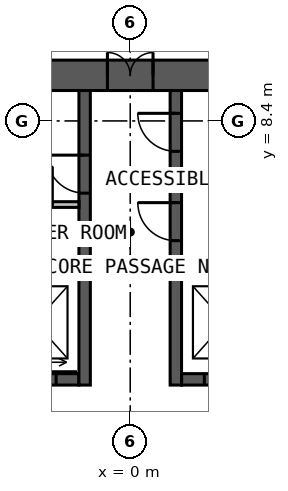
"""IFC4 building model, lengths in metres.
Left out: names, types, materials, properties, quantities, classifications, styles, units other than length and angle.
Written with IfcOpenShell. Run it as: python <this file> out.ifc"""

import sys

from ifc_helpers import new_model, si_unit, direction, frame, frame_2d, origin, place, context, subcontext, project, spatial, rectangle, extrude, element, fill, save


model = new_model("IFC4")
c1 = context("Model", 3, precision=1e-05, world=origin(), true_north=direction((0.0, 1.0)))
c2 = subcontext(c1, "Body", "Model", "MODEL_VIEW")
j1 = project(units=[si_unit("LENGTHUNIT", "METRE"), si_unit("PLANEANGLEUNIT", "RADIAN")], contexts=[c1])
p1 = place(None, origin())
s1 = spatial("IfcSite", under=j1, at=p1, CompositionType="ELEMENT")
p2 = place(p1, origin())
s2 = spatial("IfcBuilding", under=s1, at=p2, CompositionType="ELEMENT")
p3 = place(p2, frame((0.0, 0.0, 21.0)))
s3 = spatial("IfcBuildingStorey", under=s2, at=p3, CompositionType="ELEMENT", Elevation=21.0)
p4 = place(p3, frame((-10.0, 9.6, 0.0), z_axis=(0.0, 0.0, 1.0), x_axis=(1.0, 0.0, 0.0)))
e1 = element("IfcWall", 1, at=p4, inside=s3, PredefinedType="SOLIDWALL", context=c2, shape_type="SweptSolid", body=[
    extrude(rectangle(XDim=20.0, YDim=0.8, at=frame_2d((10.0, 0.0))), origin(), (0.0, 0.0, 1.0), 4.0),
])
p5 = place(p4, frame((9.4, 0.0, 0.0)))
e2 = element("IfcOpeningElement", 2, at=p5, cuts=e1, PredefinedType="OPENING", context=c2, shape_type="SweptSolid", body=[
    extrude(rectangle(XDim=1.2, YDim=2.2, at=frame_2d((0.6, 1.1))), frame((0.0, 0.41, 0.0), z_axis=(0.0, -1.0, 0.0), x_axis=(1.0, 0.0, 0.0)), (0.0, 0.0, 1.0), 0.82),
])
p6 = place(p3, frame((-6.2, 1.6, 0.0), z_axis=(0.0, 0.0, 1.0), x_axis=(1.0, 0.0, 0.0)))
e3 = element("IfcWall", 3, at=p6, inside=s3, PredefinedType="SOLIDWALL", context=c2, shape_type="SweptSolid", body=[
    extrude(rectangle(XDim=4.85, YDim=0.3, at=frame_2d((2.425, 0.0))), origin(), (0.0, 0.0, 1.0), 4.0),
])
p7 = place(p6, frame((0.625, 0.0, 0.0)))
e4 = element("IfcOpeningElement", 4, at=p7, cuts=e3, PredefinedType="OPENING", context=c2, shape_type="SweptSolid", body=[
    extrude(rectangle(XDim=1.1, YDim=2.2, at=frame_2d((0.55, 1.1))), frame((0.0, 0.16, 0.0), z_axis=(0.0, -1.0, 0.0), x_axis=(1.0, 0.0, 0.0)), (0.0, 0.0, 1.0), 0.32),
])
p8 = place(p6, frame((3.15, 0.0, 0.0)))
e5 = element("IfcOpeningElement", 5, at=p8, cuts=e3, PredefinedType="OPENING", context=c2, shape_type="SweptSolid", body=[
    extrude(rectangle(XDim=1.1, YDim=2.2, at=frame_2d((0.55, 1.1))), frame((0.0, 0.16, 0.0), z_axis=(0.0, -1.0, 0.0), x_axis=(1.0, 0.0, 0.0)), (0.0, 0.0, 1.0), 0.32),
])
p9 = place(p3, frame((1.35, 1.6, 0.0), z_axis=(0.0, 0.0, 1.0), x_axis=(1.0, 0.0, 0.0)))
e6 = element("IfcWall", 6, at=p9, inside=s3, PredefinedType="SOLIDWALL", context=c2, shape_type="SweptSolid", body=[
    extrude(rectangle(XDim=4.85, YDim=0.3, at=frame_2d((2.425, 0.0))), origin(), (0.0, 0.0, 1.0), 4.0),
])
p10 = place(p9, frame((0.6, 0.0, 0.0)))
e7 = element("IfcOpeningElement", 7, at=p10, cuts=e6, PredefinedType="OPENING", context=c2, shape_type="SweptSolid", body=[
    extrude(rectangle(XDim=1.1, YDim=2.2, at=frame_2d((0.55, 1.1))), frame((0.0, 0.16, 0.0), z_axis=(0.0, -1.0, 0.0), x_axis=(1.0, 0.0, 0.0)), (0.0, 0.0, 1.0), 0.32),
])
p11 = place(p9, frame((3.125, 0.0, 0.0)))
e8 = element("IfcOpeningElement", 8, at=p11, cuts=e6, PredefinedType="OPENING", context=c2, shape_type="SweptSolid", body=[
    extrude(rectangle(XDim=1.1, YDim=2.2, at=frame_2d((0.55, 1.1))), frame((0.0, 0.16, 0.0), z_axis=(0.0, -1.0, 0.0), x_axis=(1.0, 0.0, 0.0)), (0.0, 0.0, 1.0), 0.32),
])
for number, where, z_axis, x_axis in (
    (9, (-6.2, 4.6, 0.0), (0.0, 0.0, 1.0), (1.0, 0.0, 0.0)),
    (10, (1.35, 4.6, 0.0), (0.0, 0.0, 1.0), (1.0, 0.0, 0.0)),
):
    element("IfcWall", number, at=place(p3, frame(where, z_axis=z_axis, x_axis=x_axis)), inside=s3, PredefinedType="SOLIDWALL", context=c2, shape_type="SweptSolid", body=[
        extrude(rectangle(XDim=4.85, YDim=0.3, at=frame_2d((2.425, 0.0))), origin(), (0.0, 0.0, 1.0), 4.0),
    ])
p12 = place(p3, frame((-1.2, 1.45, 0.0), z_axis=(0.0, 0.0, 1.0), x_axis=(0.0, 1.0, 0.0)))
e11 = element("IfcWall", 11, at=p12, inside=s3, PredefinedType="SOLIDWALL", context=c2, shape_type="SweptSolid", body=[
    extrude(rectangle(XDim=7.75, YDim=0.3, at=frame_2d((3.875, 0.0))), origin(), (0.0, 0.0, 1.0), 4.0),
])
p13 = place(p12, frame((5.05, 0.0, 0.0)))
e12 = element("IfcOpeningElement", 12, at=p13, cuts=e11, PredefinedType="OPENING", context=c2, shape_type="SweptSolid", body=[
    extrude(rectangle(XDim=1.0, YDim=2.2, at=frame_2d((0.5, 1.1))), frame((0.0, 0.16, 0.0), z_axis=(0.0, -1.0, 0.0), x_axis=(1.0, 0.0, 0.0)), (0.0, 0.0, 1.0), 0.32),
])
p14 = place(p3, frame((1.2, 1.45, 0.0), z_axis=(0.0, 0.0, 1.0), x_axis=(0.0, 1.0, 0.0)))
e13 = element("IfcWall", 13, at=p14, inside=s3, PredefinedType="SOLIDWALL", context=c2, shape_type="SweptSolid", body=[
    extrude(rectangle(XDim=7.75, YDim=0.3, at=frame_2d((3.875, 0.0))), origin(), (0.0, 0.0, 1.0), 4.0),
])
p15 = place(p14, frame((3.8, 0.0, 0.0)))
e14 = element("IfcOpeningElement", 14, at=p15, cuts=e13, PredefinedType="OPENING", context=c2, shape_type="SweptSolid", body=[
    extrude(rectangle(XDim=1.0, YDim=2.2, at=frame_2d((0.5, 1.1))), frame((0.0, 0.16, 0.0), z_axis=(0.0, -1.0, 0.0), x_axis=(1.0, 0.0, 0.0)), (0.0, 0.0, 1.0), 0.32),
])
p16 = place(p14, frame((6.15, 0.0, 0.0)))
e15 = element("IfcOpeningElement", 15, at=p16, cuts=e13, PredefinedType="OPENING", context=c2, shape_type="SweptSolid", body=[
    extrude(rectangle(XDim=1.0, YDim=2.2, at=frame_2d((0.5, 1.1))), frame((0.0, 0.16, 0.0), z_axis=(0.0, -1.0, 0.0), x_axis=(1.0, 0.0, 0.0)), (0.0, 0.0, 1.0), 0.32),
])
p17 = place(p3, frame((1.35, 6.8, 0.0), z_axis=(0.0, 0.0, 1.0), x_axis=(1.0, 0.0, 0.0)))
e16 = element("IfcWall", 16, at=p17, inside=s3, PredefinedType="PARTITIONING", context=c2, shape_type="SweptSolid", body=[
    extrude(rectangle(XDim=4.85, YDim=0.15, at=frame_2d((2.425, 0.0))), origin(), (0.0, 0.0, 1.0), 3.75),
])
p18 = place(p3, frame((-6.2, 6.2, 0.0), z_axis=(0.0, 0.0, 1.0), x_axis=(1.0, 0.0, 0.0)))
e17 = element("IfcWall", 17, at=p18, inside=s3, PredefinedType="PARTITIONING", context=c2, shape_type="SweptSolid", body=[
    extrude(rectangle(XDim=4.85, YDim=0.15, at=frame_2d((2.425, 0.0))), origin(), (0.0, 0.0, 1.0), 3.75),
])
p19 = place(p18, frame((3.15, 0.0, 0.0)))
e18 = element("IfcOpeningElement", 18, at=p19, cuts=e17, PredefinedType="OPENING", context=c2, shape_type="SweptSolid", body=[
    extrude(rectangle(XDim=1.0, YDim=2.2, at=frame_2d((0.5, 1.1))), frame((0.0, 0.085, 0.0), z_axis=(0.0, -1.0, 0.0), x_axis=(1.0, 0.0, 0.0)), (0.0, 0.0, 1.0), 0.17),
])
p20 = place(p18, frame((0.75, 0.0, 0.0)))
e19 = element("IfcOpeningElement", 19, at=p20, cuts=e17, PredefinedType="OPENING", context=c2, shape_type="SweptSolid", body=[
    extrude(rectangle(XDim=0.9, YDim=2.2, at=frame_2d((0.45, 1.1))), frame((0.0, 0.085, 0.0), z_axis=(0.0, -1.0, 0.0), x_axis=(1.0, 0.0, 0.0)), (0.0, 0.0, 1.0), 0.17),
])
p21 = place(p5, origin())
e20 = element("IfcDoor", 20, at=p21, inside=s3, OperationType="DOUBLE_DOOR_SINGLE_SWING", PredefinedType="DOOR", context=c2, shape_type="SweptSolid", body=[
    extrude(rectangle(XDim=1.2, YDim=2.2, at=frame_2d((0.6, 1.1))), frame((0.0, 0.025, 0.0), z_axis=(0.0, -1.0, 0.0), x_axis=(1.0, 0.0, 0.0)), (0.0, 0.0, 1.0), 0.05),
])
fill(e2, e20)
p22 = place(p13, origin())
e21 = element("IfcDoor", 21, at=p22, inside=s3, OperationType="SINGLE_SWING_RIGHT", PredefinedType="DOOR", context=c2, shape_type="SweptSolid", body=[
    extrude(rectangle(XDim=1.0, YDim=2.2, at=frame_2d((0.5, 1.1))), frame((0.0, 0.025, 0.0), z_axis=(0.0, -1.0, 0.0), x_axis=(1.0, 0.0, 0.0)), (0.0, 0.0, 1.0), 0.05),
])
fill(e12, e21)
p23 = place(p15, origin())
e22 = element("IfcDoor", 22, at=p23, inside=s3, OperationType="SINGLE_SWING_RIGHT", PredefinedType="DOOR", context=c2, shape_type="SweptSolid", body=[
    extrude(rectangle(XDim=1.0, YDim=2.2, at=frame_2d((0.5, 1.1))), frame((0.0, 0.025, 0.0), z_axis=(0.0, -1.0, 0.0), x_axis=(1.0, 0.0, 0.0)), (0.0, 0.0, 1.0), 0.05),
])
fill(e14, e22)
p24 = place(p16, origin())
e23 = element("IfcDoor", 23, at=p24, inside=s3, OperationType="SINGLE_SWING_RIGHT", PredefinedType="DOOR", context=c2, shape_type="SweptSolid", body=[
    extrude(rectangle(XDim=1.0, YDim=2.2, at=frame_2d((0.5, 1.1))), frame((0.0, 0.025, 0.0), z_axis=(0.0, -1.0, 0.0), x_axis=(1.0, 0.0, 0.0)), (0.0, 0.0, 1.0), 0.05),
])
fill(e15, e23)
p25 = place(p8, origin())
e24 = element("IfcDoor", 24, at=p25, inside=s3, OperationType="SLIDING_TO_LEFT", PredefinedType="DOOR", context=c2, shape_type="SweptSolid", body=[
    extrude(rectangle(XDim=1.1, YDim=2.2, at=frame_2d((0.55, 1.1))), frame((0.0, 0.025, 0.0), z_axis=(0.0, -1.0, 0.0), x_axis=(1.0, 0.0, 0.0)), (0.0, 0.0, 1.0), 0.05),
])
fill(e5, e24)
p26 = place(p10, origin())
e25 = element("IfcDoor", 25, at=p26, inside=s3, OperationType="SLIDING_TO_LEFT", PredefinedType="DOOR", context=c2, shape_type="SweptSolid", body=[
    extrude(rectangle(XDim=1.1, YDim=2.2, at=frame_2d((0.55, 1.1))), frame((0.0, 0.025, 0.0), z_axis=(0.0, -1.0, 0.0), x_axis=(1.0, 0.0, 0.0)), (0.0, 0.0, 1.0), 0.05),
])
fill(e7, e25)
save(model, sys.argv[1])
